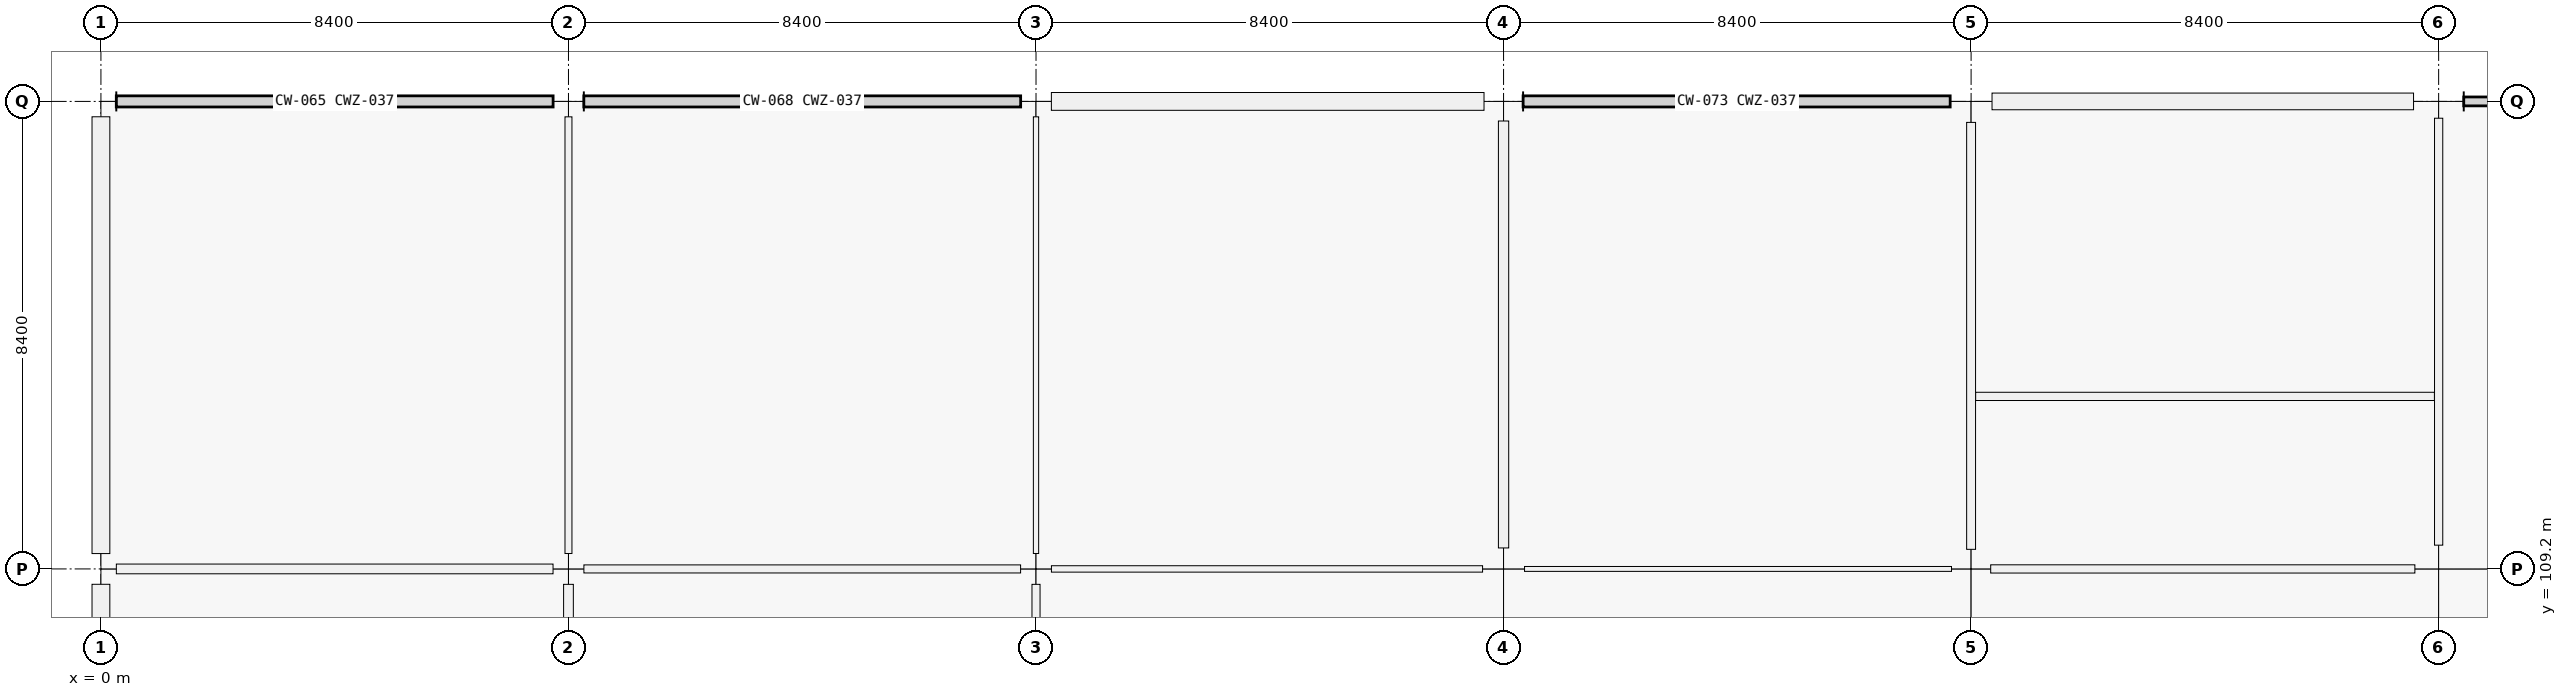
"""IFC4 building model, lengths in metres.
Left out: names, types, materials, properties, quantities, classifications, styles, units other than length and angle.
Written with IfcOpenShell. Run it as: python <this file> out.ifc"""

import sys

from ifc_helpers import new_model, si_unit, direction, frame, frame_2d, origin, origin_2d, place, context, subcontext, project, spatial, rectangle, extrude, element, fill, save


model = new_model("IFC4")
c1 = context("Model", 3, precision=1e-05, world=origin(), true_north=direction((0.0, 1.0)))
c2 = subcontext(c1, "Body", "Model", "MODEL_VIEW")
j1 = project(units=[si_unit("LENGTHUNIT", "METRE"), si_unit("PLANEANGLEUNIT", "RADIAN")], contexts=[c1])
p1 = place(None, origin())
s1 = spatial("IfcSite", under=j1, at=p1, CompositionType="ELEMENT")
p2 = place(p1, origin())
s2 = spatial("IfcBuilding", under=s1, at=p2, CompositionType="ELEMENT")
p3 = place(p2, frame((0.0, 0.0, 5.76)))
s3 = spatial("IfcBuildingStorey", under=s2, at=p3, CompositionType="ELEMENT", Elevation=5.76)
for number, where, z_axis, x_axis in (
    (1, (0.0, 109.2, 0.0), (0.0, 0.0, 1.0), (1.0, 0.0, 0.0)),
    (2, (0.0, 117.6, 0.0), (0.0, 0.0, 1.0), (1.0, 0.0, 0.0)),
    (3, (8.4, 109.2, 0.0), (0.0, 0.0, 1.0), (1.0, 0.0, 0.0)),
    (4, (8.4, 117.6, 0.0), (0.0, 0.0, 1.0), (1.0, 0.0, 0.0)),
    (5, (16.8, 109.2, 0.0), (0.0, 0.0, 1.0), (1.0, 0.0, 0.0)),
    (6, (16.8, 117.6, 0.0), (0.0, 0.0, 1.0), (1.0, 0.0, 0.0)),
):
    element("IfcColumn", number, at=place(p3, frame(where, z_axis=z_axis, x_axis=x_axis)), inside=s3, PredefinedType="COLUMN", context=c2, shape_type="SweptSolid", body=[
        extrude(rectangle(XDim=0.55, YDim=0.55, at=origin_2d()), origin(), (0.0, 0.0, 1.0), 4.2),
    ])
p4 = place(p3, frame((25.2, 109.2, 0.0), z_axis=(0.0, 0.0, 1.0), x_axis=(1.0, 0.0, 0.0)))
e7 = element("IfcColumn", 7, at=p4, inside=s3, PredefinedType="COLUMN", context=c2, shape_type="SweptSolid", body=[
    extrude(rectangle(XDim=0.75, YDim=0.75, at=origin_2d()), origin(), (0.0, 0.0, 1.0), 4.5),
])
for number, where, z_axis, x_axis in (
    (8, (25.2, 117.6, 0.0), (0.0, 0.0, 1.0), (1.0, 0.0, 0.0)),
    (9, (33.6, 109.2, 0.0), (0.0, 0.0, 1.0), (1.0, 0.0, 0.0)),
):
    element("IfcColumn", number, at=place(p3, frame(where, z_axis=z_axis, x_axis=x_axis)), inside=s3, PredefinedType="COLUMN", context=c2, shape_type="SweptSolid", body=[
        extrude(rectangle(XDim=0.7, YDim=0.7, at=origin_2d()), origin(), (0.0, 0.0, 1.0), 4.5),
    ])
p5 = place(p3, frame((33.6, 117.6, 0.0), z_axis=(0.0, 0.0, 1.0), x_axis=(1.0, 0.0, 0.0)))
e10 = element("IfcColumn", 10, at=p5, inside=s3, PredefinedType="COLUMN", context=c2, shape_type="SweptSolid", body=[
    extrude(rectangle(XDim=0.75, YDim=0.75, at=origin_2d()), origin(), (0.0, 0.0, 1.0), 4.5),
])
p6 = place(p3, frame((42.0, 109.2, 0.0), z_axis=(0.0, 0.0, 1.0), x_axis=(1.0, 0.0, 0.0)))
e11 = element("IfcColumn", 11, at=p6, inside=s3, PredefinedType="COLUMN", context=c2, shape_type="SweptSolid", body=[
    extrude(rectangle(XDim=0.85, YDim=0.85, at=origin_2d()), origin(), (0.0, 0.0, 1.0), 4.5),
])
p7 = place(p3, frame((42.0, 117.6, 0.0), z_axis=(0.0, 0.0, 1.0), x_axis=(1.0, 0.0, 0.0)))
e12 = element("IfcColumn", 12, at=p7, inside=s3, PredefinedType="COLUMN", context=c2, shape_type="SweptSolid", body=[
    extrude(rectangle(XDim=0.9, YDim=0.6, at=origin_2d()), origin(), (0.0, 0.0, 1.0), 4.5),
])
p8 = place(p3, frame((0.0, 101.076, 0.0), z_axis=(0.0, 0.0, 1.0), x_axis=(0.0, 1.0, 0.0)))
e13 = element("IfcWall", 13, at=p8, inside=s3, PredefinedType="SOLIDWALL", context=c2, shape_type="SweptSolid", body=[
    extrude(rectangle(XDim=7.848, YDim=0.32, at=frame_2d((3.924, 0.0))), origin(), (0.0, 0.0, 1.0), 3.4),
])
p9 = place(p8, frame((3.124, 0.0, 0.9)))
e14 = element("IfcOpeningElement", 14, at=p9, cuts=e13, PredefinedType="OPENING", context=c2, shape_type="SweptSolid", body=[
    extrude(rectangle(XDim=1.6, YDim=2.25, at=frame_2d((0.8, 1.125))), frame((0.0, 0.16, 0.0), z_axis=(0.0, -1.0, 0.0), x_axis=(1.0, 0.0, 0.0)), (0.0, 0.0, 1.0), 0.32),
])
p10 = place(p3, frame((0.0, 109.476, 0.0), z_axis=(0.0, 0.0, 1.0), x_axis=(0.0, 1.0, 0.0)))
e15 = element("IfcWall", 15, at=p10, inside=s3, PredefinedType="SOLIDWALL", context=c2, shape_type="SweptSolid", body=[
    extrude(rectangle(XDim=7.848, YDim=0.32, at=frame_2d((3.924, 0.0))), origin(), (0.0, 0.0, 1.0), 3.4),
])
p11 = place(p3, frame((17.076, 117.6, 0.0), z_axis=(0.0, 0.0, 1.0), x_axis=(1.0, 0.0, 0.0)))
e16 = element("IfcWall", 16, at=p11, inside=s3, PredefinedType="SOLIDWALL", context=c2, shape_type="SweptSolid", body=[
    extrude(rectangle(XDim=7.773, YDim=0.32, at=frame_2d((3.887, 0.0))), origin(), (0.0, 0.0, 1.0), 3.4),
])
p12 = place(p11, frame((3.036, 0.0, 0.9)))
e17 = element("IfcOpeningElement", 17, at=p12, cuts=e16, PredefinedType="OPENING", context=c2, shape_type="SweptSolid", body=[
    extrude(rectangle(XDim=1.7, YDim=1.85, at=frame_2d((0.85, 0.925))), frame((0.0, 0.16, 0.0), z_axis=(0.0, -1.0, 0.0), x_axis=(1.0, 0.0, 0.0)), (0.0, 0.0, 1.0), 0.32),
])
p13 = place(p3, frame((33.976, 117.6, 0.0), z_axis=(0.0, 0.0, 1.0), x_axis=(1.0, 0.0, 0.0)))
e18 = element("IfcWall", 18, at=p13, inside=s3, PredefinedType="SOLIDWALL", context=c2, shape_type="SweptSolid", body=[
    extrude(rectangle(XDim=7.573, YDim=0.3, at=frame_2d((3.787, 0.0))), origin(), (0.0, 0.0, 1.0), 3.4),
])
p14 = place(p13, frame((2.612, 0.0, 0.9)))
e19 = element("IfcOpeningElement", 19, at=p14, cuts=e18, PredefinedType="OPENING", context=c2, shape_type="SweptSolid", body=[
    extrude(rectangle(XDim=2.35, YDim=1.6, at=frame_2d((1.175, 0.8))), frame((0.0, 0.15, 0.0), z_axis=(0.0, -1.0, 0.0), x_axis=(1.0, 0.0, 0.0)), (0.0, 0.0, 1.0), 0.3),
])
p15 = place(p3, frame((0.277, 109.2, 0.0), z_axis=(0.0, 0.0, 1.0), x_axis=(1.0, 0.0, 0.0)))
e20 = element("IfcWall", 20, at=p15, inside=s3, PredefinedType="PARTITIONING", context=c2, shape_type="SweptSolid", body=[
    extrude(rectangle(XDim=7.846, YDim=0.175, at=frame_2d((3.923, 0.0))), origin(), (0.0, 0.0, 1.0), 2.4),
])
p16 = place(p15, frame((3.443, 0.0, 0.0)))
e21 = element("IfcOpeningElement", 21, at=p16, cuts=e20, PredefinedType="OPENING", context=c2, shape_type="SweptSolid", body=[
    extrude(rectangle(XDim=0.96, YDim=2.18, at=frame_2d((0.48, 1.09))), frame((0.0, 0.087, 0.0), z_axis=(0.0, -1.0, 0.0), x_axis=(1.0, 0.0, 0.0)), (0.0, 0.0, 1.0), 0.175),
])
p17 = place(p3, frame((8.677, 109.2, 0.0), z_axis=(0.0, 0.0, 1.0), x_axis=(1.0, 0.0, 0.0)))
e22 = element("IfcWall", 22, at=p17, inside=s3, PredefinedType="PARTITIONING", context=c2, shape_type="SweptSolid", body=[
    extrude(rectangle(XDim=7.846, YDim=0.145, at=frame_2d((3.923, 0.0))), origin(), (0.0, 0.0, 1.0), 2.4),
])
p18 = place(p17, frame((3.463, 0.0, 0.0)))
e23 = element("IfcOpeningElement", 23, at=p18, cuts=e22, PredefinedType="OPENING", context=c2, shape_type="SweptSolid", body=[
    extrude(rectangle(XDim=0.92, YDim=2.15, at=frame_2d((0.46, 1.075))), frame((0.0, 0.073, 0.0), z_axis=(0.0, -1.0, 0.0), x_axis=(1.0, 0.0, 0.0)), (0.0, 0.0, 1.0), 0.145),
])
p19 = place(p3, frame((17.077, 109.2, 0.0), z_axis=(0.0, 0.0, 1.0), x_axis=(1.0, 0.0, 0.0)))
e24 = element("IfcWall", 24, at=p19, inside=s3, PredefinedType="PARTITIONING", context=c2, shape_type="SweptSolid", body=[
    extrude(rectangle(XDim=7.746, YDim=0.115, at=frame_2d((3.873, 0.0))), origin(), (0.0, 0.0, 1.0), 2.4),
])
p20 = place(p19, frame((3.368, 0.0, 0.0)))
e25 = element("IfcOpeningElement", 25, at=p20, cuts=e24, PredefinedType="OPENING", context=c2, shape_type="SweptSolid", body=[
    extrude(rectangle(XDim=1.01, YDim=2.12, at=frame_2d((0.505, 1.06))), frame((0.0, 0.058, 0.0), z_axis=(0.0, -1.0, 0.0), x_axis=(1.0, 0.0, 0.0)), (0.0, 0.0, 1.0), 0.115),
])
p21 = place(p3, frame((25.577, 109.2, 0.0), z_axis=(0.0, 0.0, 1.0), x_axis=(1.0, 0.0, 0.0)))
e26 = element("IfcWall", 26, at=p21, inside=s3, PredefinedType="PARTITIONING", context=c2, shape_type="SweptSolid", body=[
    extrude(rectangle(XDim=7.671, YDim=0.088, at=frame_2d((3.835, 0.0))), origin(), (0.0, 0.0, 1.0), 2.4),
])
p22 = place(p21, frame((3.351, 0.0, 0.0)))
e27 = element("IfcOpeningElement", 27, at=p22, cuts=e26, PredefinedType="OPENING", context=c2, shape_type="SweptSolid", body=[
    extrude(rectangle(XDim=0.97, YDim=2.12, at=frame_2d((0.485, 1.06))), frame((0.0, 0.044, 0.0), z_axis=(0.0, -1.0, 0.0), x_axis=(1.0, 0.0, 0.0)), (0.0, 0.0, 1.0), 0.088),
])
p23 = place(p3, frame((33.952, 109.2, 0.0), z_axis=(0.0, 0.0, 1.0), x_axis=(1.0, 0.0, 0.0)))
e28 = element("IfcWall", 28, at=p23, inside=s3, PredefinedType="PARTITIONING", context=c2, shape_type="SweptSolid", body=[
    extrude(rectangle(XDim=7.621, YDim=0.148, at=frame_2d((3.811, 0.0))), origin(), (0.0, 0.0, 1.0), 2.4),
])
p24 = place(p3, frame((8.4, 101.077, 0.0), z_axis=(0.0, 0.0, 1.0), x_axis=(0.0, 1.0, 0.0)))
e29 = element("IfcWall", 29, at=p24, inside=s3, PredefinedType="PARTITIONING", context=c2, shape_type="SweptSolid", body=[
    extrude(rectangle(XDim=7.846, YDim=0.175, at=frame_2d((3.923, 0.0))), origin(), (0.0, 0.0, 1.0), 2.4),
])
p25 = place(p24, frame((3.433, 0.0, 0.0)))
e30 = element("IfcOpeningElement", 30, at=p25, cuts=e29, PredefinedType="OPENING", context=c2, shape_type="SweptSolid", body=[
    extrude(rectangle(XDim=0.98, YDim=2.18, at=frame_2d((0.49, 1.09))), frame((0.0, 0.087, 0.0), z_axis=(0.0, -1.0, 0.0), x_axis=(1.0, 0.0, 0.0)), (0.0, 0.0, 1.0), 0.175),
])
p26 = place(p3, frame((8.4, 109.477, 0.0), z_axis=(0.0, 0.0, 1.0), x_axis=(0.0, 1.0, 0.0)))
e31 = element("IfcWall", 31, at=p26, inside=s3, PredefinedType="PARTITIONING", context=c2, shape_type="SweptSolid", body=[
    extrude(rectangle(XDim=7.846, YDim=0.125, at=frame_2d((3.923, 0.0))), origin(), (0.0, 0.0, 1.0), 2.4),
])
p27 = place(p26, frame((3.453, 0.0, 0.0)))
e32 = element("IfcOpeningElement", 32, at=p27, cuts=e31, PredefinedType="OPENING", context=c2, shape_type="SweptSolid", body=[
    extrude(rectangle(XDim=0.94, YDim=2.15, at=frame_2d((0.47, 1.075))), frame((0.0, 0.062, 0.0), z_axis=(0.0, -1.0, 0.0), x_axis=(1.0, 0.0, 0.0)), (0.0, 0.0, 1.0), 0.125),
])
p28 = place(p3, frame((16.8, 101.077, 0.0), z_axis=(0.0, 0.0, 1.0), x_axis=(0.0, 1.0, 0.0)))
e33 = element("IfcWall", 33, at=p28, inside=s3, PredefinedType="PARTITIONING", context=c2, shape_type="SweptSolid", body=[
    extrude(rectangle(XDim=7.846, YDim=0.145, at=frame_2d((3.923, 0.0))), origin(), (0.0, 0.0, 1.0), 2.4),
])
p29 = place(p28, frame((3.383, 0.0, 0.0)))
e34 = element("IfcOpeningElement", 34, at=p29, cuts=e33, PredefinedType="OPENING", context=c2, shape_type="SweptSolid", body=[
    extrude(rectangle(XDim=1.08, YDim=2.22, at=frame_2d((0.54, 1.11))), frame((0.0, 0.073, 0.0), z_axis=(0.0, -1.0, 0.0), x_axis=(1.0, 0.0, 0.0)), (0.0, 0.0, 1.0), 0.145),
])
p30 = place(p3, frame((16.8, 109.477, 0.0), z_axis=(0.0, 0.0, 1.0), x_axis=(0.0, 1.0, 0.0)))
e35 = element("IfcWall", 35, at=p30, inside=s3, PredefinedType="PARTITIONING", context=c2, shape_type="SweptSolid", body=[
    extrude(rectangle(XDim=7.846, YDim=0.095, at=frame_2d((3.923, 0.0))), origin(), (0.0, 0.0, 1.0), 2.4),
])
p31 = place(p30, frame((3.458, 0.0, 0.0)))
e36 = element("IfcOpeningElement", 36, at=p31, cuts=e35, PredefinedType="OPENING", context=c2, shape_type="SweptSolid", body=[
    extrude(rectangle(XDim=0.93, YDim=2.12, at=frame_2d((0.465, 1.06))), frame((0.0, 0.047, 0.0), z_axis=(0.0, -1.0, 0.0), x_axis=(1.0, 0.0, 0.0)), (0.0, 0.0, 1.0), 0.095),
])
p32 = place(p3, frame((25.2, 109.577, 0.0), z_axis=(0.0, 0.0, 1.0), x_axis=(0.0, 1.0, 0.0)))
e37 = element("IfcWall", 37, at=p32, inside=s3, PredefinedType="PARTITIONING", context=c2, shape_type="SweptSolid", body=[
    extrude(rectangle(XDim=7.671, YDim=0.185, at=frame_2d((3.835, 0.0))), origin(), (0.0, 0.0, 1.0), 2.4),
])
p33 = place(p32, frame((3.336, 0.0, 0.0)))
e38 = element("IfcOpeningElement", 38, at=p33, cuts=e37, PredefinedType="OPENING", context=c2, shape_type="SweptSolid", body=[
    extrude(rectangle(XDim=1.0, YDim=2.2, at=frame_2d((0.5, 1.1))), frame((0.0, 0.093, 0.0), z_axis=(0.0, -1.0, 0.0), x_axis=(1.0, 0.0, 0.0)), (0.0, 0.0, 1.0), 0.185),
])
p34 = place(p3, frame((33.6, 109.552, 0.0), z_axis=(0.0, 0.0, 1.0), x_axis=(0.0, 1.0, 0.0)))
e39 = element("IfcWall", 39, at=p34, inside=s3, PredefinedType="PARTITIONING", context=c2, shape_type="SweptSolid", body=[
    extrude(rectangle(XDim=7.671, YDim=0.16, at=frame_2d((3.835, 0.0))), origin(), (0.0, 0.0, 1.0), 2.4),
])
p35 = place(p3, frame((42.0, 109.627, 0.0), z_axis=(0.0, 0.0, 1.0), x_axis=(0.0, 1.0, 0.0)))
e40 = element("IfcWall", 40, at=p35, inside=s3, PredefinedType="PARTITIONING", context=c2, shape_type="SweptSolid", body=[
    extrude(rectangle(XDim=7.671, YDim=0.148, at=frame_2d((3.835, 0.0))), origin(), (0.0, 0.0, 1.0), 2.4),
])
p36 = place(p35, frame((0.713, 0.0, 0.0)))
e41 = element("IfcOpeningElement", 41, at=p36, cuts=e40, PredefinedType="OPENING", context=c2, shape_type="SweptSolid", body=[
    extrude(rectangle(XDim=1.1, YDim=2.15, at=frame_2d((0.55, 1.075))), frame((0.0, 0.074, 0.0), z_axis=(0.0, -1.0, 0.0), x_axis=(1.0, 0.0, 0.0)), (0.0, 0.0, 1.0), 0.148),
])
p37 = place(p35, frame((4.658, 0.0, 0.0)))
e42 = element("IfcOpeningElement", 42, at=p37, cuts=e40, PredefinedType="OPENING", context=c2, shape_type="SweptSolid", body=[
    extrude(rectangle(XDim=1.05, YDim=2.15, at=frame_2d((0.525, 1.075))), frame((0.0, 0.074, 0.0), z_axis=(0.0, -1.0, 0.0), x_axis=(1.0, 0.0, 0.0)), (0.0, 0.0, 1.0), 0.148),
])
p38 = place(p3, frame((33.682, 112.3, 0.0), z_axis=(0.0, 0.0, 1.0), x_axis=(1.0, 0.0, 0.0)))
e43 = element("IfcWall", 43, at=p38, inside=s3, PredefinedType="PARTITIONING", context=c2, shape_type="SweptSolid", body=[
    extrude(rectangle(XDim=8.242, YDim=0.148, at=frame_2d((4.121, 0.0))), origin(), (0.0, 0.0, 1.0), 2.4),
])
p39 = place(p12, origin())
e44 = element("IfcWindow", 44, at=p39, inside=s3, PartitioningType="SINGLE_PANEL", PredefinedType="WINDOW", context=c2, shape_type="SweptSolid", body=[
    extrude(rectangle(XDim=1.7, YDim=1.85, at=frame_2d((0.85, 0.925))), frame((0.0, 0.03, 0.0), z_axis=(0.0, -1.0, 0.0), x_axis=(1.0, 0.0, 0.0)), (0.0, 0.0, 1.0), 0.06),
])
fill(e17, e44)
p40 = place(p14, origin())
e45 = element("IfcWindow", 45, at=p40, inside=s3, PartitioningType="SINGLE_PANEL", PredefinedType="WINDOW", context=c2, shape_type="SweptSolid", body=[
    extrude(rectangle(XDim=2.35, YDim=1.6, at=frame_2d((1.175, 0.8))), frame((0.0, 0.03, 0.0), z_axis=(0.0, -1.0, 0.0), x_axis=(1.0, 0.0, 0.0)), (0.0, 0.0, 1.0), 0.06),
])
fill(e19, e45)
p41 = place(p36, origin())
e46 = element("IfcDoor", 46, at=p41, inside=s3, OperationType="SINGLE_SWING_RIGHT", PredefinedType="DOOR", context=c2, shape_type="SweptSolid", body=[
    extrude(rectangle(XDim=1.1, YDim=2.15, at=frame_2d((0.55, 1.075))), frame((0.0, 0.025, 0.0), z_axis=(0.0, -1.0, 0.0), x_axis=(1.0, 0.0, 0.0)), (0.0, 0.0, 1.0), 0.05),
])
fill(e41, e46)
p42 = place(p37, origin())
e47 = element("IfcDoor", 47, at=p42, inside=s3, OperationType="SINGLE_SWING_LEFT", PredefinedType="DOOR", context=c2, shape_type="SweptSolid", body=[
    extrude(rectangle(XDim=1.05, YDim=2.15, at=frame_2d((0.525, 1.075))), frame((0.0, 0.025, 0.0), z_axis=(0.0, -1.0, 0.0), x_axis=(1.0, 0.0, 0.0)), (0.0, 0.0, 1.0), 0.05),
])
fill(e42, e47)
p43 = place(p20, origin())
e48 = element("IfcDoor", 48, at=p43, inside=s3, OperationType="SINGLE_SWING_RIGHT", PredefinedType="DOOR", context=c2, shape_type="SweptSolid", body=[
    extrude(rectangle(XDim=1.01, YDim=2.12, at=frame_2d((0.505, 1.06))), frame((0.0, 0.025, 0.0), z_axis=(0.0, -1.0, 0.0), x_axis=(1.0, 0.0, 0.0)), (0.0, 0.0, 1.0), 0.05),
])
fill(e25, e48)
p44 = place(p22, origin())
e49 = element("IfcDoor", 49, at=p44, inside=s3, OperationType="SINGLE_SWING_LEFT", PredefinedType="DOOR", context=c2, shape_type="SweptSolid", body=[
    extrude(rectangle(XDim=0.97, YDim=2.12, at=frame_2d((0.485, 1.06))), frame((0.0, 0.025, 0.0), z_axis=(0.0, -1.0, 0.0), x_axis=(1.0, 0.0, 0.0)), (0.0, 0.0, 1.0), 0.05),
])
fill(e27, e49)
p45 = place(p16, origin())
e50 = element("IfcDoor", 50, at=p45, inside=s3, OperationType="SINGLE_SWING_LEFT", PredefinedType="DOOR", context=c2, shape_type="SweptSolid", body=[
    extrude(rectangle(XDim=0.96, YDim=2.18, at=frame_2d((0.48, 1.09))), frame((0.0, 0.025, 0.0), z_axis=(0.0, -1.0, 0.0), x_axis=(1.0, 0.0, 0.0)), (0.0, 0.0, 1.0), 0.05),
])
fill(e21, e50)
p46 = place(p18, origin())
e51 = element("IfcDoor", 51, at=p46, inside=s3, OperationType="SINGLE_SWING_LEFT", PredefinedType="DOOR", context=c2, shape_type="SweptSolid", body=[
    extrude(rectangle(XDim=0.92, YDim=2.15, at=frame_2d((0.46, 1.075))), frame((0.0, 0.025, 0.0), z_axis=(0.0, -1.0, 0.0), x_axis=(1.0, 0.0, 0.0)), (0.0, 0.0, 1.0), 0.05),
])
fill(e23, e51)
p47 = place(p27, origin())
e52 = element("IfcDoor", 52, at=p47, inside=s3, OperationType="SINGLE_SWING_RIGHT", PredefinedType="DOOR", context=c2, shape_type="SweptSolid", body=[
    extrude(rectangle(XDim=0.94, YDim=2.15, at=frame_2d((0.47, 1.075))), frame((0.0, 0.025, 0.0), z_axis=(0.0, -1.0, 0.0), x_axis=(1.0, 0.0, 0.0)), (0.0, 0.0, 1.0), 0.05),
])
fill(e32, e52)
p48 = place(p31, origin())
e53 = element("IfcDoor", 53, at=p48, inside=s3, OperationType="SINGLE_SWING_LEFT", PredefinedType="DOOR", context=c2, shape_type="SweptSolid", body=[
    extrude(rectangle(XDim=0.93, YDim=2.12, at=frame_2d((0.465, 1.06))), frame((0.0, 0.025, 0.0), z_axis=(0.0, -1.0, 0.0), x_axis=(1.0, 0.0, 0.0)), (0.0, 0.0, 1.0), 0.05),
])
fill(e36, e53)
p49 = place(p33, origin())
e54 = element("IfcDoor", 54, at=p49, inside=s3, OperationType="SINGLE_SWING_RIGHT", PredefinedType="DOOR", context=c2, shape_type="SweptSolid", body=[
    extrude(rectangle(XDim=1.0, YDim=2.2, at=frame_2d((0.5, 1.1))), frame((0.0, 0.025, 0.0), z_axis=(0.0, -1.0, 0.0), x_axis=(1.0, 0.0, 0.0)), (0.0, 0.0, 1.0), 0.05),
])
fill(e38, e54)
save(model, sys.argv[1])
